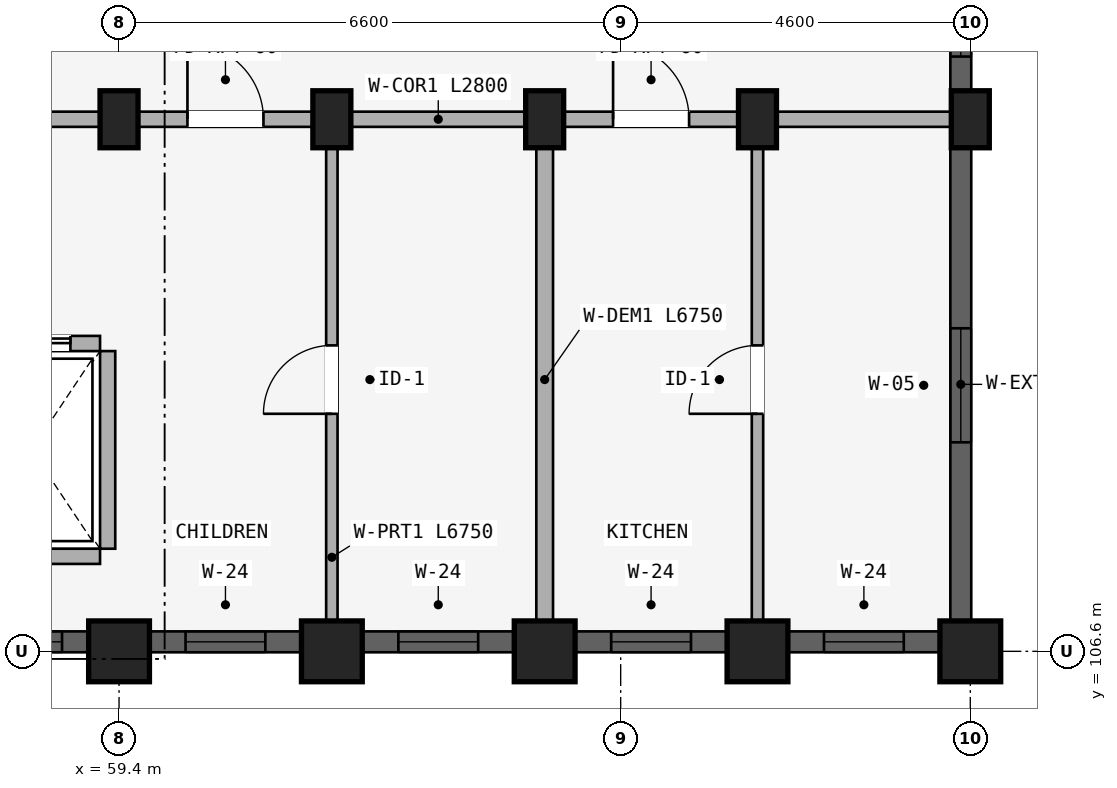
"""IFC4 building model, lengths in metres.
Left out: names, types, materials, properties, quantities, classifications, styles, units other than length and angle.
Written with IfcOpenShell. Run it as: python <this file> out.ifc"""

import sys

from ifc_helpers import new_model, si_unit, direction, frame, frame_2d, origin, origin_2d, place, context, subcontext, project, spatial, rectangle, extrude, element, fill, save


model = new_model("IFC4")
c1 = context("Model", 3, precision=1e-05, world=origin(), true_north=direction((0.0, 1.0)))
c2 = subcontext(c1, "Body", "Model", "MODEL_VIEW")
j1 = project(units=[si_unit("LENGTHUNIT", "METRE"), si_unit("PLANEANGLEUNIT", "RADIAN")], contexts=[c1])
p1 = place(None, origin())
s1 = spatial("IfcSite", under=j1, at=p1, CompositionType="ELEMENT")
p2 = place(p1, origin())
s2 = spatial("IfcBuilding", under=s1, at=p2, CompositionType="ELEMENT")
p3 = place(p2, frame((0.0, 0.0, 8.7)))
s3 = spatial("IfcBuildingStorey", under=s2, at=p3, CompositionType="ELEMENT", Elevation=8.7)
p4 = place(p3, frame((59.4, 106.6, 0.0), z_axis=(0.0, 0.0, 1.0), x_axis=(1.0, 0.0, 0.0)))
e1 = element("IfcColumn", 1, at=p4, inside=s3, PredefinedType="COLUMN", context=c2, shape_type="SweptSolid", body=[
    extrude(rectangle(XDim=0.8, YDim=0.8, at=origin_2d()), origin(), (0.0, 0.0, 1.0), 2.93),
])
p5 = place(p3, frame((59.4, 113.6, 0.0), z_axis=(0.0, 0.0, 1.0), x_axis=(1.0, 0.0, 0.0)))
e2 = element("IfcColumn", 2, at=p5, inside=s3, PredefinedType="COLUMN", context=c2, shape_type="SweptSolid", body=[
    extrude(rectangle(XDim=0.5, YDim=0.75, at=origin_2d()), origin(), (0.0, 0.0, 1.0), 2.93),
])
p6 = place(p3, frame((62.2, 106.6, 0.0), z_axis=(0.0, 0.0, 1.0), x_axis=(1.0, 0.0, 0.0)))
e3 = element("IfcColumn", 3, at=p6, inside=s3, PredefinedType="COLUMN", context=c2, shape_type="SweptSolid", body=[
    extrude(rectangle(XDim=0.8, YDim=0.8, at=origin_2d()), origin(), (0.0, 0.0, 1.0), 2.93),
])
p7 = place(p3, frame((62.2, 113.6, 0.0), z_axis=(0.0, 0.0, 1.0), x_axis=(1.0, 0.0, 0.0)))
e4 = element("IfcColumn", 4, at=p7, inside=s3, PredefinedType="COLUMN", context=c2, shape_type="SweptSolid", body=[
    extrude(rectangle(XDim=0.5, YDim=0.75, at=origin_2d()), origin(), (0.0, 0.0, 1.0), 2.93),
])
p8 = place(p3, frame((65.0, 106.6, 0.0), z_axis=(0.0, 0.0, 1.0), x_axis=(1.0, 0.0, 0.0)))
e5 = element("IfcColumn", 5, at=p8, inside=s3, PredefinedType="COLUMN", context=c2, shape_type="SweptSolid", body=[
    extrude(rectangle(XDim=0.8, YDim=0.8, at=origin_2d()), origin(), (0.0, 0.0, 1.0), 2.93),
])
p9 = place(p3, frame((65.0, 113.6, 0.0), z_axis=(0.0, 0.0, 1.0), x_axis=(1.0, 0.0, 0.0)))
e6 = element("IfcColumn", 6, at=p9, inside=s3, PredefinedType="COLUMN", context=c2, shape_type="SweptSolid", body=[
    extrude(rectangle(XDim=0.5, YDim=0.75, at=origin_2d()), origin(), (0.0, 0.0, 1.0), 2.93),
])
p10 = place(p3, frame((67.8, 106.6, 0.0), z_axis=(0.0, 0.0, 1.0), x_axis=(1.0, 0.0, 0.0)))
e7 = element("IfcColumn", 7, at=p10, inside=s3, PredefinedType="COLUMN", context=c2, shape_type="SweptSolid", body=[
    extrude(rectangle(XDim=0.8, YDim=0.8, at=origin_2d()), origin(), (0.0, 0.0, 1.0), 2.93),
])
p11 = place(p3, frame((67.8, 113.6, 0.0), z_axis=(0.0, 0.0, 1.0), x_axis=(1.0, 0.0, 0.0)))
e8 = element("IfcColumn", 8, at=p11, inside=s3, PredefinedType="COLUMN", context=c2, shape_type="SweptSolid", body=[
    extrude(rectangle(XDim=0.5, YDim=0.75, at=origin_2d()), origin(), (0.0, 0.0, 1.0), 2.93),
])
p12 = place(p3, frame((70.6, 106.6, 0.0), z_axis=(0.0, 0.0, 1.0), x_axis=(1.0, 0.0, 0.0)))
e9 = element("IfcColumn", 9, at=p12, inside=s3, PredefinedType="COLUMN", context=c2, shape_type="SweptSolid", body=[
    extrude(rectangle(XDim=0.8, YDim=0.8, at=origin_2d()), origin(), (0.0, 0.0, 1.0), 2.93),
])
p13 = place(p3, frame((70.6, 113.6, 0.0), z_axis=(0.0, 0.0, 1.0), x_axis=(1.0, 0.0, 0.0)))
e10 = element("IfcColumn", 10, at=p13, inside=s3, PredefinedType="COLUMN", context=c2, shape_type="SweptSolid", body=[
    extrude(rectangle(XDim=0.5, YDim=0.75, at=origin_2d()), origin(), (0.0, 0.0, 1.0), 2.93),
])
p14 = place(p3, frame((59.25, 107.95, 0.0), z_axis=(0.0, 0.0, 1.0), x_axis=(0.0, 1.0, 0.0)))
e11 = element("IfcWall", 11, at=p14, inside=s3, PredefinedType="STANDARD", context=c2, shape_type="SweptSolid", body=[
    extrude(rectangle(XDim=2.6, YDim=0.2, at=frame_2d((1.3, 0.0))), origin(), (0.0, 0.0, 1.0), 2.372),
])
p15 = place(p3, frame((57.35, 107.85, 0.0), z_axis=(0.0, 0.0, 1.0), x_axis=(1.0, 0.0, 0.0)))
e12 = element("IfcWall", 12, at=p15, inside=s3, PredefinedType="STANDARD", context=c2, shape_type="SweptSolid", body=[
    extrude(rectangle(XDim=1.8, YDim=0.2, at=frame_2d((0.9, 0.0))), origin(), (0.0, 0.0, 1.0), 2.93),
])
p16 = place(p3, frame((57.35, 110.65, 0.0), z_axis=(0.0, 0.0, 1.0), x_axis=(1.0, 0.0, 0.0)))
e13 = element("IfcWall", 13, at=p16, inside=s3, PredefinedType="STANDARD", context=c2, shape_type="SweptSolid", body=[
    extrude(rectangle(XDim=1.8, YDim=0.2, at=frame_2d((0.9, 0.0))), origin(), (0.0, 0.0, 1.0), 2.93),
])
p17 = place(p16, frame((0.39, 0.0, 0.0)))
e14 = element("IfcOpeningElement", 14, at=p17, cuts=e13, PredefinedType="OPENING", context=c2, shape_type="SweptSolid", body=[
    extrude(rectangle(XDim=1.02, YDim=2.15, at=frame_2d((0.51, 1.075))), frame((0.0, 0.11, 0.0), z_axis=(0.0, -1.0, 0.0), x_axis=(1.0, 0.0, 0.0)), (0.0, 0.0, 1.0), 0.22),
])
p18 = place(p3, frame((53.75, 113.6, 0.0), z_axis=(0.0, 0.0, 1.0), x_axis=(1.0, 0.0, 0.0)))
e15 = element("IfcWall", 15, at=p18, inside=s3, PredefinedType="STANDARD", context=c2, shape_type="SweptSolid", body=[
    extrude(rectangle(XDim=5.6, YDim=0.2, at=frame_2d((2.8, 0.0))), origin(), (0.0, 0.0, 1.0), 2.372),
])
p19 = place(p18, frame((1.91, 0.0, 0.0)))
e16 = element("IfcOpeningElement", 16, at=p19, cuts=e15, PredefinedType="OPENING", context=c2, shape_type="SweptSolid", body=[
    extrude(rectangle(XDim=1.22, YDim=2.15, at=frame_2d((0.61, 1.075))), frame((0.0, 0.11, 0.0), z_axis=(0.0, -1.0, 0.0), x_axis=(1.0, 0.0, 0.0)), (0.0, 0.0, 1.0), 0.22),
])
p20 = place(p3, frame((59.4, 113.6, 0.0), z_axis=(0.0, 0.0, 1.0), x_axis=(1.0, 0.0, 0.0)))
e17 = element("IfcWall", 17, at=p20, inside=s3, PredefinedType="STANDARD", context=c2, shape_type="SweptSolid", body=[
    extrude(rectangle(XDim=2.8, YDim=0.2, at=frame_2d((1.4, 0.0))), origin(), (0.0, 0.0, 1.0), 2.372),
])
p21 = place(p20, frame((0.9, 0.0, 0.0)))
e18 = element("IfcOpeningElement", 18, at=p21, cuts=e17, PredefinedType="OPENING", context=c2, shape_type="SweptSolid", body=[
    extrude(rectangle(XDim=1.0, YDim=2.15, at=frame_2d((0.5, 1.075))), frame((0.0, 0.11, 0.0), z_axis=(0.0, -1.0, 0.0), x_axis=(1.0, 0.0, 0.0)), (0.0, 0.0, 1.0), 0.22),
])
p22 = place(p3, frame((62.2, 113.6, 0.0), z_axis=(0.0, 0.0, 1.0), x_axis=(1.0, 0.0, 0.0)))
e19 = element("IfcWall", 19, at=p22, inside=s3, PredefinedType="STANDARD", context=c2, shape_type="SweptSolid", body=[
    extrude(rectangle(XDim=2.8, YDim=0.2, at=frame_2d((1.4, 0.0))), origin(), (0.0, 0.0, 1.0), 2.372),
])
p23 = place(p3, frame((65.0, 113.6, 0.0), z_axis=(0.0, 0.0, 1.0), x_axis=(1.0, 0.0, 0.0)))
e20 = element("IfcWall", 20, at=p23, inside=s3, PredefinedType="STANDARD", context=c2, shape_type="SweptSolid", body=[
    extrude(rectangle(XDim=2.8, YDim=0.2, at=frame_2d((1.4, 0.0))), origin(), (0.0, 0.0, 1.0), 2.372),
])
p24 = place(p23, frame((0.9, 0.0, 0.0)))
e21 = element("IfcOpeningElement", 21, at=p24, cuts=e20, PredefinedType="OPENING", context=c2, shape_type="SweptSolid", body=[
    extrude(rectangle(XDim=1.0, YDim=2.15, at=frame_2d((0.5, 1.075))), frame((0.0, 0.11, 0.0), z_axis=(0.0, -1.0, 0.0), x_axis=(1.0, 0.0, 0.0)), (0.0, 0.0, 1.0), 0.22),
])
p25 = place(p3, frame((67.8, 113.6, 0.0), z_axis=(0.0, 0.0, 1.0), x_axis=(1.0, 0.0, 0.0)))
e22 = element("IfcWall", 22, at=p25, inside=s3, PredefinedType="STANDARD", context=c2, shape_type="SweptSolid", body=[
    extrude(rectangle(XDim=2.8, YDim=0.2, at=frame_2d((1.4, 0.0))), origin(), (0.0, 0.0, 1.0), 2.372),
])
p26 = place(p3, frame((62.2, 106.8, 0.0), z_axis=(0.0, 0.0, 1.0), x_axis=(0.0, 1.0, 0.0)))
e23 = element("IfcWall", 23, at=p26, inside=s3, PredefinedType="PARTITIONING", context=c2, shape_type="SweptSolid", body=[
    extrude(rectangle(XDim=6.75, YDim=0.15, at=frame_2d((3.375, 0.0))), origin(), (0.0, 0.0, 1.0), 2.372),
])
p27 = place(p26, frame((2.925, 0.0, 0.0)))
e24 = element("IfcOpeningElement", 24, at=p27, cuts=e23, PredefinedType="OPENING", context=c2, shape_type="SweptSolid", body=[
    extrude(rectangle(XDim=0.9, YDim=2.1, at=frame_2d((0.45, 1.05))), frame((0.0, 0.085, 0.0), z_axis=(0.0, -1.0, 0.0), x_axis=(1.0, 0.0, 0.0)), (0.0, 0.0, 1.0), 0.17),
])
p28 = place(p3, frame((65.0, 106.8, 0.0), z_axis=(0.0, 0.0, 1.0), x_axis=(0.0, 1.0, 0.0)))
e25 = element("IfcWall", 25, at=p28, inside=s3, PredefinedType="STANDARD", context=c2, shape_type="SweptSolid", body=[
    extrude(rectangle(XDim=6.75, YDim=0.22, at=frame_2d((3.375, 0.0))), origin(), (0.0, 0.0, 1.0), 2.372),
])
p29 = place(p3, frame((67.8, 106.8, 0.0), z_axis=(0.0, 0.0, 1.0), x_axis=(0.0, 1.0, 0.0)))
e26 = element("IfcWall", 26, at=p29, inside=s3, PredefinedType="PARTITIONING", context=c2, shape_type="SweptSolid", body=[
    extrude(rectangle(XDim=6.75, YDim=0.15, at=frame_2d((3.375, 0.0))), origin(), (0.0, 0.0, 1.0), 2.372),
])
p30 = place(p29, frame((2.925, 0.0, 0.0)))
e27 = element("IfcOpeningElement", 27, at=p30, cuts=e26, PredefinedType="OPENING", context=c2, shape_type="SweptSolid", body=[
    extrude(rectangle(XDim=0.9, YDim=2.1, at=frame_2d((0.45, 1.05))), frame((0.0, 0.085, 0.0), z_axis=(0.0, -1.0, 0.0), x_axis=(1.0, 0.0, 0.0)), (0.0, 0.0, 1.0), 0.17),
])
p31 = place(p3, frame((56.628, 106.725, 0.0), z_axis=(0.0, 0.0, 1.0), x_axis=(1.0, 0.0, 0.0)))
e28 = element("IfcWall", 28, at=p31, inside=s3, PredefinedType="STANDARD", context=c2, shape_type="SweptSolid", body=[
    extrude(rectangle(XDim=2.422, YDim=0.275, at=frame_2d((1.211, 0.0))), origin(), (0.0, 0.0, 1.0), 2.472),
])
p32 = place(p31, frame((0.822, 0.0, 0.772)))
e29 = element("IfcOpeningElement", 29, at=p32, cuts=e28, PredefinedType="OPENING", context=c2, shape_type="SweptSolid", body=[
    extrude(rectangle(XDim=1.2, YDim=1.5, at=frame_2d((0.6, 0.75))), frame((0.0, 0.147, 0.0), z_axis=(0.0, -1.0, 0.0), x_axis=(1.0, 0.0, 0.0)), (0.0, 0.0, 1.0), 0.295),
])
p33 = place(p3, frame((59.803, 106.725, 0.0), z_axis=(0.0, 0.0, 1.0), x_axis=(1.0, 0.0, 0.0)))
e30 = element("IfcWall", 30, at=p33, inside=s3, PredefinedType="STANDARD", context=c2, shape_type="SweptSolid", body=[
    extrude(rectangle(XDim=1.993, YDim=0.275, at=frame_2d((0.997, 0.0))), origin(), (0.0, 0.0, 1.0), 2.472),
])
p34 = place(p33, frame((0.471, 0.0, 0.88)))
e31 = element("IfcOpeningElement", 31, at=p34, cuts=e30, PredefinedType="OPENING", context=c2, shape_type="SweptSolid", body=[
    extrude(rectangle(XDim=1.05, YDim=1.25, at=frame_2d((0.525, 0.625))), frame((0.0, 0.147, 0.0), z_axis=(0.0, -1.0, 0.0), x_axis=(1.0, 0.0, 0.0)), (0.0, 0.0, 1.0), 0.295),
])
p35 = place(p3, frame((62.604, 106.725, 0.0), z_axis=(0.0, 0.0, 1.0), x_axis=(1.0, 0.0, 0.0)))
e32 = element("IfcWall", 32, at=p35, inside=s3, PredefinedType="STANDARD", context=c2, shape_type="SweptSolid", body=[
    extrude(rectangle(XDim=1.993, YDim=0.275, at=frame_2d((0.997, 0.0))), origin(), (0.0, 0.0, 1.0), 2.472),
])
p36 = place(p35, frame((0.471, 0.0, 0.88)))
e33 = element("IfcOpeningElement", 33, at=p36, cuts=e32, PredefinedType="OPENING", context=c2, shape_type="SweptSolid", body=[
    extrude(rectangle(XDim=1.05, YDim=1.25, at=frame_2d((0.525, 0.625))), frame((0.0, 0.147, 0.0), z_axis=(0.0, -1.0, 0.0), x_axis=(1.0, 0.0, 0.0)), (0.0, 0.0, 1.0), 0.295),
])
p37 = place(p3, frame((65.404, 106.725, 0.0), z_axis=(0.0, 0.0, 1.0), x_axis=(1.0, 0.0, 0.0)))
e34 = element("IfcWall", 34, at=p37, inside=s3, PredefinedType="STANDARD", context=c2, shape_type="SweptSolid", body=[
    extrude(rectangle(XDim=1.993, YDim=0.275, at=frame_2d((0.997, 0.0))), origin(), (0.0, 0.0, 1.0), 2.472),
])
p38 = place(p37, frame((0.471, 0.0, 0.88)))
e35 = element("IfcOpeningElement", 35, at=p38, cuts=e34, PredefinedType="OPENING", context=c2, shape_type="SweptSolid", body=[
    extrude(rectangle(XDim=1.05, YDim=1.25, at=frame_2d((0.525, 0.625))), frame((0.0, 0.147, 0.0), z_axis=(0.0, -1.0, 0.0), x_axis=(1.0, 0.0, 0.0)), (0.0, 0.0, 1.0), 0.295),
])
p39 = place(p3, frame((68.204, 106.725, 0.0), z_axis=(0.0, 0.0, 1.0), x_axis=(1.0, 0.0, 0.0)))
e36 = element("IfcWall", 36, at=p39, inside=s3, PredefinedType="STANDARD", context=c2, shape_type="SweptSolid", body=[
    extrude(rectangle(XDim=1.993, YDim=0.275, at=frame_2d((0.997, 0.0))), origin(), (0.0, 0.0, 1.0), 2.472),
])
p40 = place(p39, frame((0.471, 0.0, 0.88)))
e37 = element("IfcOpeningElement", 37, at=p40, cuts=e36, PredefinedType="OPENING", context=c2, shape_type="SweptSolid", body=[
    extrude(rectangle(XDim=1.05, YDim=1.25, at=frame_2d((0.525, 0.625))), frame((0.0, 0.147, 0.0), z_axis=(0.0, -1.0, 0.0), x_axis=(1.0, 0.0, 0.0)), (0.0, 0.0, 1.0), 0.295),
])
p41 = place(p3, frame((70.475, 107.003, 0.0), z_axis=(0.0, 0.0, 1.0), x_axis=(0.0, 1.0, 0.0)))
e38 = element("IfcWall", 38, at=p41, inside=s3, PredefinedType="STANDARD", context=c2, shape_type="SweptSolid", body=[
    extrude(rectangle(XDim=6.218, YDim=0.275, at=frame_2d((3.109, 0.0))), origin(), (0.0, 0.0, 1.0), 2.372),
])
p42 = place(p41, frame((2.346, 0.0, 0.522)))
e39 = element("IfcOpeningElement", 39, at=p42, cuts=e38, PredefinedType="OPENING", context=c2, shape_type="SweptSolid", body=[
    extrude(rectangle(XDim=1.5, YDim=1.65, at=frame_2d((0.75, 0.825))), frame((0.0, 0.147, 0.0), z_axis=(0.0, -1.0, 0.0), x_axis=(1.0, 0.0, 0.0)), (0.0, 0.0, 1.0), 0.295),
])
p43 = place(p3, frame((70.475, 113.979, 0.0), z_axis=(0.0, 0.0, 1.0), x_axis=(0.0, 1.0, 0.0)))
e40 = element("IfcWall", 40, at=p43, inside=s3, PredefinedType="STANDARD", context=c2, shape_type="SweptSolid", body=[
    extrude(rectangle(XDim=1.643, YDim=0.275, at=frame_2d((0.822, 0.0))), origin(), (0.0, 0.0, 1.0), 2.372),
])
p44 = place(p43, frame((0.447, 0.0, 0.88)))
e41 = element("IfcOpeningElement", 41, at=p44, cuts=e40, PredefinedType="OPENING", context=c2, shape_type="SweptSolid", body=[
    extrude(rectangle(XDim=0.75, YDim=1.05, at=frame_2d((0.375, 0.525))), frame((0.0, 0.147, 0.0), z_axis=(0.0, -1.0, 0.0), x_axis=(1.0, 0.0, 0.0)), (0.0, 0.0, 1.0), 0.295),
])
p45 = place(p32, origin())
e42 = element("IfcWindow", 42, at=p45, inside=s3, PartitioningType="SINGLE_PANEL", PredefinedType="WINDOW", context=c2, shape_type="SweptSolid", body=[
    extrude(rectangle(XDim=1.2, YDim=1.5, at=frame_2d((0.6, 0.75))), frame((0.0, 0.03, 0.0), z_axis=(0.0, -1.0, 0.0), x_axis=(1.0, 0.0, 0.0)), (0.0, 0.0, 1.0), 0.06),
])
fill(e29, e42)
p46 = place(p34, origin())
e43 = element("IfcWindow", 43, at=p46, inside=s3, PartitioningType="SINGLE_PANEL", PredefinedType="WINDOW", context=c2, shape_type="SweptSolid", body=[
    extrude(rectangle(XDim=1.05, YDim=1.25, at=frame_2d((0.525, 0.625))), frame((0.0, 0.03, 0.0), z_axis=(0.0, -1.0, 0.0), x_axis=(1.0, 0.0, 0.0)), (0.0, 0.0, 1.0), 0.06),
])
fill(e31, e43)
p47 = place(p36, origin())
e44 = element("IfcWindow", 44, at=p47, inside=s3, PartitioningType="SINGLE_PANEL", PredefinedType="WINDOW", context=c2, shape_type="SweptSolid", body=[
    extrude(rectangle(XDim=1.05, YDim=1.25, at=frame_2d((0.525, 0.625))), frame((0.0, 0.03, 0.0), z_axis=(0.0, -1.0, 0.0), x_axis=(1.0, 0.0, 0.0)), (0.0, 0.0, 1.0), 0.06),
])
fill(e33, e44)
p48 = place(p38, origin())
e45 = element("IfcWindow", 45, at=p48, inside=s3, PartitioningType="SINGLE_PANEL", PredefinedType="WINDOW", context=c2, shape_type="SweptSolid", body=[
    extrude(rectangle(XDim=1.05, YDim=1.25, at=frame_2d((0.525, 0.625))), frame((0.0, 0.03, 0.0), z_axis=(0.0, -1.0, 0.0), x_axis=(1.0, 0.0, 0.0)), (0.0, 0.0, 1.0), 0.06),
])
fill(e35, e45)
p49 = place(p40, origin())
e46 = element("IfcWindow", 46, at=p49, inside=s3, PartitioningType="SINGLE_PANEL", PredefinedType="WINDOW", context=c2, shape_type="SweptSolid", body=[
    extrude(rectangle(XDim=1.05, YDim=1.25, at=frame_2d((0.525, 0.625))), frame((0.0, 0.03, 0.0), z_axis=(0.0, -1.0, 0.0), x_axis=(1.0, 0.0, 0.0)), (0.0, 0.0, 1.0), 0.06),
])
fill(e37, e46)
p50 = place(p42, origin())
e47 = element("IfcWindow", 47, at=p50, inside=s3, PartitioningType="DOUBLE_PANEL_VERTICAL", PredefinedType="WINDOW", context=c2, shape_type="SweptSolid", body=[
    extrude(rectangle(XDim=1.5, YDim=1.65, at=frame_2d((0.75, 0.825))), frame((0.0, 0.03, 0.0), z_axis=(0.0, -1.0, 0.0), x_axis=(1.0, 0.0, 0.0)), (0.0, 0.0, 1.0), 0.06),
])
fill(e39, e47)
p51 = place(p44, origin())
e48 = element("IfcWindow", 48, at=p51, inside=s3, PartitioningType="SINGLE_PANEL", PredefinedType="WINDOW", context=c2, shape_type="SweptSolid", body=[
    extrude(rectangle(XDim=0.75, YDim=1.05, at=frame_2d((0.375, 0.525))), frame((0.0, 0.03, 0.0), z_axis=(0.0, -1.0, 0.0), x_axis=(1.0, 0.0, 0.0)), (0.0, 0.0, 1.0), 0.06),
])
fill(e41, e48)
p52 = place(p17, origin())
e49 = element("IfcDoor", 49, at=p52, inside=s3, OperationType="SLIDING_TO_RIGHT", PredefinedType="DOOR", context=c2, shape_type="SweptSolid", body=[
    extrude(rectangle(XDim=1.02, YDim=2.15, at=frame_2d((0.51, 1.075))), frame((0.0, 0.025, 0.0), z_axis=(0.0, -1.0, 0.0), x_axis=(1.0, 0.0, 0.0)), (0.0, 0.0, 1.0), 0.05),
])
fill(e14, e49)
p53 = place(p21, frame((1.0, 0.0, 0.0), z_axis=(0.0, 0.0, 1.0), x_axis=(-1.0, 0.0, 0.0)))
e50 = element("IfcDoor", 50, at=p53, inside=s3, OperationType="SINGLE_SWING_RIGHT", PredefinedType="DOOR", context=c2, shape_type="SweptSolid", body=[
    extrude(rectangle(XDim=1.0, YDim=2.15, at=frame_2d((0.5, 1.075))), frame((0.0, 0.025, 0.0), z_axis=(0.0, -1.0, 0.0), x_axis=(1.0, 0.0, 0.0)), (0.0, 0.0, 1.0), 0.05),
])
fill(e18, e50)
p54 = place(p24, frame((1.0, 0.0, 0.0), z_axis=(0.0, 0.0, 1.0), x_axis=(-1.0, 0.0, 0.0)))
e51 = element("IfcDoor", 51, at=p54, inside=s3, OperationType="SINGLE_SWING_RIGHT", PredefinedType="DOOR", context=c2, shape_type="SweptSolid", body=[
    extrude(rectangle(XDim=1.0, YDim=2.15, at=frame_2d((0.5, 1.075))), frame((0.0, 0.025, 0.0), z_axis=(0.0, -1.0, 0.0), x_axis=(1.0, 0.0, 0.0)), (0.0, 0.0, 1.0), 0.05),
])
fill(e21, e51)
p55 = place(p27, origin())
e52 = element("IfcDoor", 52, at=p55, inside=s3, OperationType="SINGLE_SWING_LEFT", PredefinedType="DOOR", context=c2, shape_type="SweptSolid", body=[
    extrude(rectangle(XDim=0.9, YDim=2.1, at=frame_2d((0.45, 1.05))), frame((0.0, 0.025, 0.0), z_axis=(0.0, -1.0, 0.0), x_axis=(1.0, 0.0, 0.0)), (0.0, 0.0, 1.0), 0.05),
])
fill(e24, e52)
p56 = place(p30, frame((0.9, 0.0, 0.0), z_axis=(0.0, 0.0, 1.0), x_axis=(-1.0, 0.0, 0.0)))
e53 = element("IfcDoor", 53, at=p56, inside=s3, OperationType="SINGLE_SWING_RIGHT", PredefinedType="DOOR", context=c2, shape_type="SweptSolid", body=[
    extrude(rectangle(XDim=0.9, YDim=2.1, at=frame_2d((0.45, 1.05))), frame((0.0, 0.025, 0.0), z_axis=(0.0, -1.0, 0.0), x_axis=(1.0, 0.0, 0.0)), (0.0, 0.0, 1.0), 0.05),
])
fill(e27, e53)
save(model, sys.argv[1])
